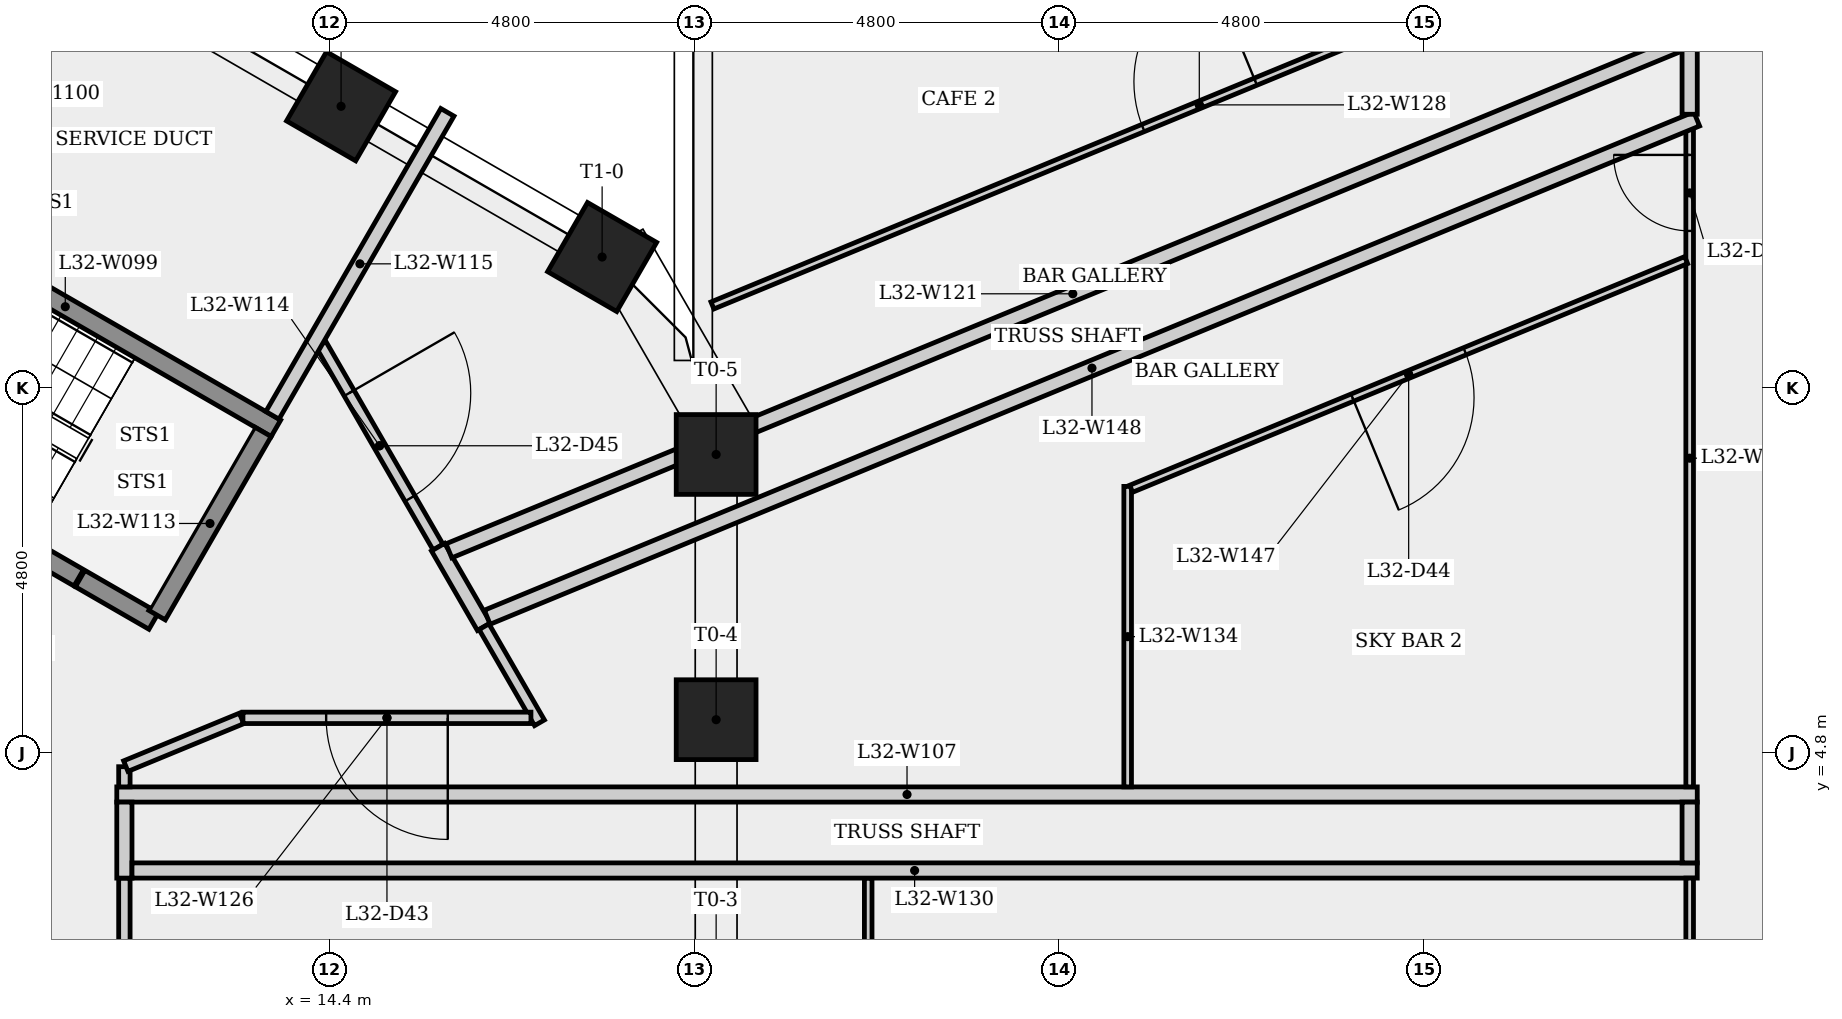
"""IFC4 building model, lengths in metres.
Left out: names, types, materials, properties, quantities, classifications, styles, units other than length and angle.
Written with IfcOpenShell. Run it as: python <this file> out.ifc"""

import sys

from ifc_helpers import new_model, si_unit, direction, frame, frame_2d, origin, origin_2d, place, context, subcontext, project, spatial, rectangle, extrude, element, fill, save


model = new_model("IFC4")
c1 = context("Model", 3, precision=1e-05, world=origin(), true_north=direction((0.0, 1.0)))
c2 = subcontext(c1, "Body", "Model", "MODEL_VIEW")
j1 = project(units=[si_unit("LENGTHUNIT", "METRE"), si_unit("PLANEANGLEUNIT", "RADIAN")], contexts=[c1])
p1 = place(None, origin())
s1 = spatial("IfcSite", under=j1, at=p1, CompositionType="ELEMENT")
p2 = place(p1, origin())
s2 = spatial("IfcBuilding", under=s1, at=p2, CompositionType="ELEMENT")
p3 = place(p2, frame((0.0, 0.0, 120.5)))
s3 = spatial("IfcBuildingStorey", under=s2, at=p3, CompositionType="ELEMENT", Elevation=120.5)
for number, where, z_axis, x_axis in (
    (1, (19.486, 5.234, 0.0), (0.0, 0.0, 1.0), (1.0, 0.0, 0.0)),
    (2, (19.486, 8.724, 0.0), (0.0, 0.0, 1.0), (1.0, 0.0, 0.0)),
    (3, (17.986, 11.322, 0.0), (0.0, 0.0, 1.0), (0.5, 0.866, 0.0)),
    (4, (14.551, 13.305, 0.0), (0.0, 0.0, 1.0), (0.5, 0.866, 0.0)),
):
    element("IfcColumn", number, at=place(p3, frame(where, z_axis=z_axis, x_axis=x_axis)), inside=s3, PredefinedType="COLUMN", context=c2, shape_type="SweptSolid", body=[
        extrude(rectangle(XDim=1.05, YDim=1.05, at=origin_2d()), origin(), (0.0, 0.0, 1.0), 4.0),
    ])
p4 = place(p3, frame((8.151, 12.268, 0.0), z_axis=(0.0, 0.0, 1.0), x_axis=(0.866025499775, -0.499999833739, 0.0)))
e5 = element("IfcWall", 5, at=p4, inside=s3, PredefinedType="SHEAR", context=c2, shape_type="SweptSolid", body=[
    extrude(rectangle(XDim=6.4, YDim=0.25, at=frame_2d((3.2, 0.0))), origin(), (0.0, 0.0, 1.0), 3.6),
])
p5 = place(p3, frame((11.1, 7.101, 0.0), z_axis=(0.0, 0.0, 1.0), x_axis=(-0.8660265141, 0.499998076872, 0.0)))
e6 = element("IfcWall", 6, at=p5, inside=s3, PredefinedType="SHEAR", context=c2, shape_type="SweptSolid", body=[
    extrude(rectangle(XDim=5.137, YDim=0.25, at=frame_2d((2.569, 0.0))), origin(), (0.0, 0.0, 1.0), 3.6),
])
p6 = place(p5, frame((3.987, 0.0, 0.0)))
e7 = element("IfcOpeningElement", 7, at=p6, cuts=e6, PredefinedType="OPENING", context=c2, shape_type="SweptSolid", body=[
    extrude(rectangle(XDim=1.0, YDim=2.1, at=frame_2d((0.5, 1.05))), frame((0.0, 0.135, 0.0), z_axis=(0.0, -1.0, 0.0), x_axis=(1.0, 0.0, 0.0)), (0.0, 0.0, 1.0), 0.27),
])
p7 = place(p3, frame((11.7, 3.15, 0.0), z_axis=(0.0, 0.0, 1.0), x_axis=(0.0, -1.0, 0.0)))
e8 = element("IfcWall", 8, at=p7, inside=s3, PredefinedType="PARTITIONING", context=c2, shape_type="SweptSolid", body=[
    extrude(rectangle(XDim=6.609, YDim=0.15, at=frame_2d((3.304, 0.0))), origin(), (0.0, 0.0, 1.0), 3.6),
])
p8 = place(p7, frame((2.504, 0.0, 0.0)))
e9 = element("IfcOpeningElement", 9, at=p8, cuts=e8, PredefinedType="OPENING", context=c2, shape_type="SweptSolid", body=[
    extrude(rectangle(XDim=1.6, YDim=2.1, at=frame_2d((0.8, 1.05))), frame((0.0, 0.085, 0.0), z_axis=(0.0, -1.0, 0.0), x_axis=(1.0, 0.0, 0.0)), (0.0, 0.0, 1.0), 0.17),
])
p9 = place(p3, frame((11.6, 4.25, 0.0), z_axis=(0.0, 0.0, 1.0), x_axis=(1.0, 0.0, 0.0)))
e10 = element("IfcWall", 10, at=p9, inside=s3, PredefinedType="PLUMBINGWALL", context=c2, shape_type="SweptSolid", body=[
    extrude(rectangle(XDim=20.794, YDim=0.2, at=frame_2d((10.397, 0.0))), origin(), (0.0, 0.0, 1.0), 3.6),
])
p10 = place(p3, frame((11.7, 4.15, 0.0), z_axis=(0.0, 0.0, 1.0), x_axis=(0.0, -1.0, 0.0)))
e11 = element("IfcWall", 11, at=p10, inside=s3, PredefinedType="PLUMBINGWALL", context=c2, shape_type="SweptSolid", body=[
    extrude(rectangle(XDim=1.0, YDim=0.2, at=frame_2d((0.5, 0.0))), origin(), (0.0, 0.0, 1.0), 3.6),
])
p11 = place(p3, frame((11.7, 4.616, 0.0), z_axis=(0.0, 0.0, 1.0), x_axis=(0.0, -1.0, 0.0)))
e12 = element("IfcWall", 12, at=p11, inside=s3, PredefinedType="PARTITIONING", context=c2, shape_type="SweptSolid", body=[
    extrude(rectangle(XDim=0.266, YDim=0.15, at=frame_2d((0.133, 0.0))), origin(), (0.0, 0.0, 1.0), 3.6),
])
p12 = place(p3, frame((11.719, 4.623, 0.0), z_axis=(0.0, 0.0, 1.0), x_axis=(0.924625912524, 0.380876517901, 0.0)))
e13 = element("IfcWall", 13, at=p12, inside=s3, PredefinedType="PARTITIONING", context=c2, shape_type="SweptSolid", body=[
    extrude(rectangle(XDim=1.647, YDim=0.15, at=frame_2d((0.824, 0.0))), origin(), (0.0, 0.0, 1.0), 3.6),
])
p13 = place(p3, frame((12.085, 6.532, 0.0), z_axis=(0.0, 0.0, 1.0), x_axis=(-0.86604373436, 0.499968249168, 0.0)))
e14 = element("IfcWall", 14, at=p13, inside=s3, PredefinedType="SHEAR", context=c2, shape_type="SweptSolid", body=[
    extrude(rectangle(XDim=1.118, YDim=0.25, at=frame_2d((0.559, 0.0))), origin(), (0.0, 0.0, 1.0), 3.6),
])
p14 = place(p3, frame((13.523, 9.022, 0.0), z_axis=(0.0, 0.0, 1.0), x_axis=(-0.500013277472, -0.866017737897, 0.0)))
e15 = element("IfcWall", 15, at=p14, inside=s3, PredefinedType="SHEAR", context=c2, shape_type="SweptSolid", body=[
    extrude(rectangle(XDim=2.786, YDim=0.25, at=frame_2d((1.393, 0.0))), origin(), (0.0, 0.0, 1.0), 3.6),
])
p15 = place(p3, frame((14.287, 10.172, 0.0), z_axis=(0.0, 0.0, 1.0), x_axis=(0.500017452277, -0.866015327473, 0.0)))
e16 = element("IfcWall", 16, at=p15, inside=s3, PredefinedType="PARTITIONING", context=c2, shape_type="SweptSolid", body=[
    extrude(rectangle(XDim=3.081, YDim=0.15, at=frame_2d((1.54, 0.0))), origin(), (0.0, 0.0, 1.0), 3.6),
])
p16 = place(p15, frame((0.74, 0.0, 0.0)))
e17 = element("IfcOpeningElement", 17, at=p16, cuts=e16, PredefinedType="OPENING", context=c2, shape_type="SweptSolid", body=[
    extrude(rectangle(XDim=1.6, YDim=2.1, at=frame_2d((0.8, 1.05))), frame((0.0, 0.085, 0.0), z_axis=(0.0, -1.0, 0.0), x_axis=(1.0, 0.0, 0.0)), (0.0, 0.0, 1.0), 0.17),
])
p17 = place(p3, frame((13.648, 9.239, 0.0), z_axis=(0.0, 0.0, 1.0), x_axis=(0.499971870506, 0.866041643746, 0.0)))
e18 = element("IfcWall", 18, at=p17, inside=s3, PredefinedType="PLUMBINGWALL", context=c2, shape_type="SweptSolid", body=[
    extrude(rectangle(XDim=4.604, YDim=0.2, at=frame_2d((2.302, 0.0))), origin(), (0.0, 0.0, 1.0), 3.6),
])
p18 = place(p3, frame((15.827, 7.505, 0.0), z_axis=(0.0, 0.0, 1.0), x_axis=(0.500112762726, -0.865960290405, 0.0)))
e19 = element("IfcWall", 19, at=p18, inside=s3, PredefinedType="PLUMBINGWALL", context=c2, shape_type="SweptSolid", body=[
    extrude(rectangle(XDim=1.209, YDim=0.2, at=frame_2d((0.604, 0.0))), origin(), (0.0, 0.0, 1.0), 3.6),
])
p19 = place(p3, frame((15.969, 7.456, 0.0), z_axis=(0.0, 0.0, 1.0), x_axis=(0.924606037794, 0.380924762749, 0.0)))
e20 = element("IfcWall", 20, at=p19, inside=s3, PredefinedType="PLUMBINGWALL", context=c2, shape_type="SweptSolid", body=[
    extrude(rectangle(XDim=17.756, YDim=0.2, at=frame_2d((8.878, 0.0))), origin(), (0.0, 0.0, 1.0), 3.6),
])
p20 = place(p3, frame((16.431, 6.458, 0.0), z_axis=(0.0, 0.0, 1.0), x_axis=(0.49998782916, -0.866032430508, 0.0)))
e21 = element("IfcWall", 21, at=p20, inside=s3, PredefinedType="PARTITIONING", context=c2, shape_type="SweptSolid", body=[
    extrude(rectangle(XDim=1.46, YDim=0.15, at=frame_2d((0.73, 0.0))), origin(), (0.0, 0.0, 1.0), 3.6),
])
p21 = place(p3, frame((17.049, 5.259, 0.0), z_axis=(0.0, 0.0, 1.0), x_axis=(-1.0, 0.0, 0.0)))
e22 = element("IfcWall", 22, at=p21, inside=s3, PredefinedType="PARTITIONING", context=c2, shape_type="SweptSolid", body=[
    extrude(rectangle(XDim=3.789, YDim=0.15, at=frame_2d((1.895, 0.0))), origin(), (0.0, 0.0, 1.0), 3.6),
])
p22 = place(p21, frame((1.094, 0.0, 0.0)))
e23 = element("IfcOpeningElement", 23, at=p22, cuts=e22, PredefinedType="OPENING", context=c2, shape_type="SweptSolid", body=[
    extrude(rectangle(XDim=1.6, YDim=2.1, at=frame_2d((0.8, 1.05))), frame((0.0, 0.085, 0.0), z_axis=(0.0, -1.0, 0.0), x_axis=(1.0, 0.0, 0.0)), (0.0, 0.0, 1.0), 0.17),
])
p23 = place(p3, frame((19.437, 10.685, 0.0), z_axis=(0.0, 0.0, 1.0), x_axis=(0.924603272901, 0.380931473813, 0.0)))
e24 = element("IfcWall", 24, at=p23, inside=s3, PredefinedType="PARTITIONING", context=c2, shape_type="SweptSolid", body=[
    extrude(rectangle(XDim=13.856, YDim=0.1, at=frame_2d((6.928, 0.0))), origin(), (0.0, 0.0, 1.0), 3.6),
])
p24 = place(p23, frame((6.128, 0.0, 0.0)))
e25 = element("IfcOpeningElement", 25, at=p24, cuts=e24, PredefinedType="OPENING", context=c2, shape_type="SweptSolid", body=[
    extrude(rectangle(XDim=1.6, YDim=2.1, at=frame_2d((0.8, 1.05))), frame((0.0, 0.06, 0.0), z_axis=(0.0, -1.0, 0.0), x_axis=(1.0, 0.0, 0.0)), (0.0, 0.0, 1.0), 0.12),
])
p25 = place(p3, frame((21.486, -5.9, 0.0), z_axis=(0.0, 0.0, 1.0), x_axis=(0.0, 1.0, 0.0)))
e26 = element("IfcWall", 26, at=p25, inside=s3, PredefinedType="PARTITIONING", context=c2, shape_type="SweptSolid", body=[
    extrude(rectangle(XDim=9.05, YDim=0.1, at=frame_2d((4.525, 0.0))), origin(), (0.0, 0.0, 1.0), 3.6),
])
p26 = place(p3, frame((11.8, 3.25, 0.0), z_axis=(0.0, 0.0, 1.0), x_axis=(1.0, 0.0, 0.0)))
e27 = element("IfcWall", 27, at=p26, inside=s3, PredefinedType="PLUMBINGWALL", context=c2, shape_type="SweptSolid", body=[
    extrude(rectangle(XDim=20.594, YDim=0.2, at=frame_2d((10.297, 0.0))), origin(), (0.0, 0.0, 1.0), 3.6),
])
p27 = place(p3, frame((24.9, 8.304, 0.0), z_axis=(0.0, 0.0, 1.0), x_axis=(0.0, -1.0, 0.0)))
e28 = element("IfcWall", 28, at=p27, inside=s3, PredefinedType="PARTITIONING", context=c2, shape_type="SweptSolid", body=[
    extrude(rectangle(XDim=3.954, YDim=0.1, at=frame_2d((1.977, 0.0))), origin(), (0.0, 0.0, 1.0), 3.6),
])
p28 = place(p3, frame((32.294, -7.65, 0.0), z_axis=(0.0, 0.0, 1.0), x_axis=(0.0, 1.0, 0.0)))
e29 = element("IfcWall", 29, at=p28, inside=s3, PredefinedType="PARTITIONING", context=c2, shape_type="SweptSolid", body=[
    extrude(rectangle(XDim=10.8, YDim=0.1, at=frame_2d((5.4, 0.0))), origin(), (0.0, 0.0, 1.0), 3.6),
])
p29 = place(p28, frame((5.465, 0.0, 0.0)))
e30 = element("IfcOpeningElement", 30, at=p29, cuts=e29, PredefinedType="OPENING", context=c2, shape_type="SweptSolid", body=[
    extrude(rectangle(XDim=1.6, YDim=2.1, at=frame_2d((0.8, 1.05))), frame((0.0, 0.06, 0.0), z_axis=(0.0, -1.0, 0.0), x_axis=(1.0, 0.0, 0.0)), (0.0, 0.0, 1.0), 0.12),
])
p30 = place(p3, frame((32.294, 4.35, 0.0), z_axis=(0.0, 0.0, 1.0), x_axis=(0.0, 1.0, 0.0)))
e31 = element("IfcWall", 31, at=p30, inside=s3, PredefinedType="PARTITIONING", context=c2, shape_type="SweptSolid", body=[
    extrude(rectangle(XDim=8.651, YDim=0.1, at=frame_2d((4.325, 0.0))), origin(), (0.0, 0.0, 1.0), 3.6),
])
p31 = place(p30, frame((7.315, 0.0, 0.0)))
e32 = element("IfcOpeningElement", 32, at=p31, cuts=e31, PredefinedType="OPENING", context=c2, shape_type="SweptSolid", body=[
    extrude(rectangle(XDim=1.0, YDim=2.1, at=frame_2d((0.5, 1.05))), frame((0.0, 0.06, 0.0), z_axis=(0.0, -1.0, 0.0), x_axis=(1.0, 0.0, 0.0)), (0.0, 0.0, 1.0), 0.12),
])
p32 = place(p3, frame((32.294, 4.15, 0.0), z_axis=(0.0, 0.0, 1.0), x_axis=(0.0, -1.0, 0.0)))
e33 = element("IfcWall", 33, at=p32, inside=s3, PredefinedType="PLUMBINGWALL", context=c2, shape_type="SweptSolid", body=[
    extrude(rectangle(XDim=0.8, YDim=0.2, at=frame_2d((0.4, 0.0))), origin(), (0.0, 0.0, 1.0), 3.6),
])
p33 = place(p3, frame((32.248, 11.281, 0.0), z_axis=(0.0, 0.0, 1.0), x_axis=(-0.924598044609, -0.380944163763, 0.0)))
e34 = element("IfcWall", 34, at=p33, inside=s3, PredefinedType="PARTITIONING", context=c2, shape_type="SweptSolid", body=[
    extrude(rectangle(XDim=7.897, YDim=0.1, at=frame_2d((3.948, 0.0))), origin(), (0.0, 0.0, 1.0), 3.6),
])
p34 = place(p33, frame((3.148, 0.0, 0.0)))
e35 = element("IfcOpeningElement", 35, at=p34, cuts=e34, PredefinedType="OPENING", context=c2, shape_type="SweptSolid", body=[
    extrude(rectangle(XDim=1.6, YDim=2.1, at=frame_2d((0.8, 1.05))), frame((0.0, 0.06, 0.0), z_axis=(0.0, -1.0, 0.0), x_axis=(1.0, 0.0, 0.0)), (0.0, 0.0, 1.0), 0.12),
])
p35 = place(p3, frame((32.387, 13.138, 0.0), z_axis=(0.0, 0.0, 1.0), x_axis=(-0.924603164354, -0.380931737279, 0.0)))
e36 = element("IfcWall", 36, at=p35, inside=s3, PredefinedType="PLUMBINGWALL", context=c2, shape_type="SweptSolid", body=[
    extrude(rectangle(XDim=17.21, YDim=0.2, at=frame_2d((8.605, 0.0))), origin(), (0.0, 0.0, 1.0), 3.6),
])
p36 = place(p3, frame((32.294, 14.082, 0.0), z_axis=(0.0, 0.0, 1.0), x_axis=(0.0, -1.0, 0.0)))
e37 = element("IfcWall", 37, at=p36, inside=s3, PredefinedType="PLUMBINGWALL", context=c2, shape_type="SweptSolid", body=[
    extrude(rectangle(XDim=0.881, YDim=0.2, at=frame_2d((0.441, 0.0))), origin(), (0.0, 0.0, 1.0), 3.6),
])
p37 = place(p31, origin())
e38 = element("IfcDoor", 38, at=p37, inside=s3, OperationType="SINGLE_SWING_RIGHT", PredefinedType="DOOR", context=c2, shape_type="SweptSolid", body=[
    extrude(rectangle(XDim=1.0, YDim=2.1, at=frame_2d((0.5, 1.05))), frame((0.0, 0.025, 0.0), z_axis=(0.0, -1.0, 0.0), x_axis=(1.0, 0.0, 0.0)), (0.0, 0.0, 1.0), 0.05),
])
fill(e32, e38)
p38 = place(p22, origin())
e39 = element("IfcDoor", 39, at=p38, inside=s3, OperationType="SINGLE_SWING_LEFT", PredefinedType="DOOR", context=c2, shape_type="SweptSolid", body=[
    extrude(rectangle(XDim=1.6, YDim=2.1, at=frame_2d((0.8, 1.05))), frame((0.0, 0.025, 0.0), z_axis=(0.0, -1.0, 0.0), x_axis=(1.0, 0.0, 0.0)), (0.0, 0.0, 1.0), 0.05),
])
fill(e23, e39)
p39 = place(p34, origin())
e40 = element("IfcDoor", 40, at=p39, inside=s3, OperationType="SINGLE_SWING_RIGHT", PredefinedType="DOOR", context=c2, shape_type="SweptSolid", body=[
    extrude(rectangle(XDim=1.6, YDim=2.1, at=frame_2d((0.8, 1.05))), frame((0.0, 0.025, 0.0), z_axis=(0.0, -1.0, 0.0), x_axis=(1.0, 0.0, 0.0)), (0.0, 0.0, 1.0), 0.05),
])
fill(e35, e40)
p40 = place(p16, origin())
e41 = element("IfcDoor", 41, at=p40, inside=s3, OperationType="SINGLE_SWING_LEFT", PredefinedType="DOOR", context=c2, shape_type="SweptSolid", body=[
    extrude(rectangle(XDim=1.6, YDim=2.1, at=frame_2d((0.8, 1.05))), frame((0.0, 0.025, 0.0), z_axis=(0.0, -1.0, 0.0), x_axis=(1.0, 0.0, 0.0)), (0.0, 0.0, 1.0), 0.05),
])
fill(e17, e41)
p41 = place(p24, origin())
e42 = element("IfcDoor", 42, at=p41, inside=s3, OperationType="SINGLE_SWING_RIGHT", PredefinedType="DOOR", context=c2, shape_type="SweptSolid", body=[
    extrude(rectangle(XDim=1.6, YDim=2.1, at=frame_2d((0.8, 1.05))), frame((0.0, 0.025, 0.0), z_axis=(0.0, -1.0, 0.0), x_axis=(1.0, 0.0, 0.0)), (0.0, 0.0, 1.0), 0.05),
])
fill(e25, e42)
save(model, sys.argv[1])
